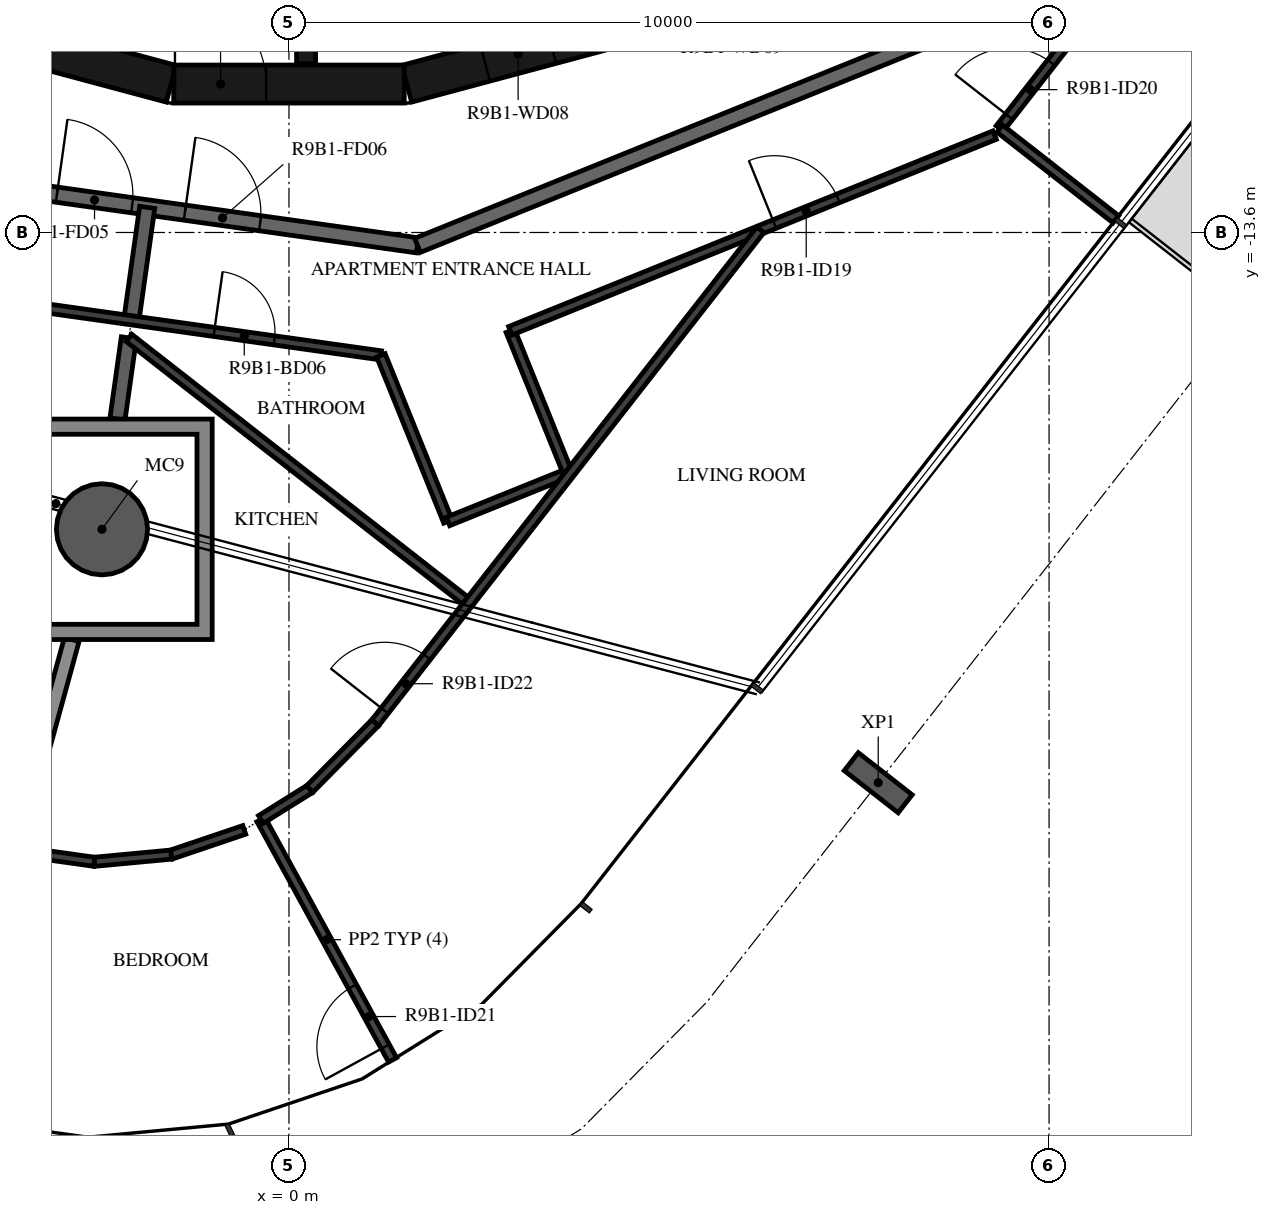
"""IFC4 building model, lengths in metres.
Left out: names, types, materials, properties, quantities, classifications, styles, units other than length and angle.
Written with IfcOpenShell. Run it as: python <this file> out.ifc"""

import sys

from ifc_helpers import new_model, si_unit, direction, frame, frame_2d, origin, origin_2d, place, context, subcontext, project, spatial, polyline, rectangle, hollow_circle, i_section, outline, extrude, element, fill, save


model = new_model("IFC4")
c1 = context("Model", 3, precision=1e-05, world=origin(), true_north=direction((0.0, 1.0)))
c2 = subcontext(c1, "Body", "Model", "MODEL_VIEW")
j1 = project(units=[si_unit("LENGTHUNIT", "METRE"), si_unit("PLANEANGLEUNIT", "RADIAN")], contexts=[c1])
p1 = place(None, origin())
s1 = spatial("IfcSite", under=j1, at=p1, CompositionType="ELEMENT")
p2 = place(p1, origin())
s2 = spatial("IfcBuilding", under=s1, at=p2, CompositionType="ELEMENT")
p3 = place(p2, frame((0.0, 0.0, 343.5)))
s3 = spatial("IfcBuildingStorey", under=s2, at=p3, CompositionType="ELEMENT", Elevation=343.5)
p4 = place(p3, frame((-2.46, -17.505, -0.38), z_axis=(0.0, 0.0, 1.0), x_axis=(1.0, 0.0, 0.0)))
e1 = element("IfcColumn", 1, at=p4, inside=s3, PredefinedType="COLUMN", context=c2, shape_type="SweptSolid", body=[
    extrude(hollow_circle(Radius=0.6, WallThickness=0.03, at=origin_2d()), origin(), (0.0, 0.0, 1.0), 3.5),
])
p5 = place(p3, frame((7.752, -20.839, -0.38), z_axis=(0.0, 0.0, 1.0), x_axis=(-0.615661060634, -0.788011077599, 0.0)))
e2 = element("IfcColumn", 2, at=p5, inside=s3, PredefinedType="COLUMN", context=c2, shape_type="SweptSolid", body=[
    extrude(i_section(OverallWidth=0.3, OverallDepth=0.9, WebThickness=0.019, FlangeThickness=0.035, FilletRadius=0.03, at=origin_2d()), origin(), (0.0, 0.0, 1.0), 3.5),
])
p6 = place(p3, frame((1.55, -11.643, 0.0), z_axis=(0.0, 0.0, 1.0), x_axis=(0.965948410781, 0.258734743916, 0.0)))
e3 = element("IfcWall", 3, at=p6, inside=s3, PredefinedType="SHEAR", context=c2, shape_type="SweptSolid", body=[
    extrude(rectangle(XDim=3.033, YDim=0.5, at=frame_2d((1.516, 0.0))), origin(), (0.0, 0.0, 1.0), 3.12),
])
p7 = place(p6, frame((1.066, 0.0, 0.0)))
e4 = element("IfcOpeningElement", 4, at=p7, cuts=e3, PredefinedType="OPENING", context=c2, shape_type="SweptSolid", body=[
    extrude(rectangle(XDim=0.9, YDim=2.1, at=frame_2d((0.45, 1.05))), frame((0.0, 0.26, 0.0), z_axis=(0.0, -1.0, 0.0), x_axis=(1.0, 0.0, 0.0)), (0.0, 0.0, 1.0), 0.52),
])
p8 = place(p3, frame((-4.479, -10.858, 0.0), z_axis=(0.0, 0.0, 1.0), x_axis=(0.965948410781, -0.258734743916, 0.0)))
e5 = element("IfcWall", 5, at=p8, inside=s3, PredefinedType="SHEAR", context=c2, shape_type="SweptSolid", body=[
    extrude(rectangle(XDim=3.033, YDim=0.5, at=frame_2d((1.516, 0.0))), origin(), (0.0, 0.0, 1.0), 3.12),
])
p9 = place(p3, frame((-1.516, -11.647, 0.0), z_axis=(0.0, 0.0, 1.0), x_axis=(1.0, 0.0, 0.0)))
e6 = element("IfcWall", 6, at=p9, inside=s3, PredefinedType="SHEAR", context=c2, shape_type="SweptSolid", body=[
    extrude(rectangle(XDim=3.033, YDim=0.5, at=frame_2d((1.516, 0.0))), origin(), (0.0, 0.0, 1.0), 3.12),
])
p10 = place(p9, frame((0.016, 0.0, 0.0)))
e7 = element("IfcOpeningElement", 7, at=p10, cuts=e6, PredefinedType="OPENING", context=c2, shape_type="SweptSolid", body=[
    extrude(rectangle(XDim=1.2, YDim=2.1, at=frame_2d((0.6, 1.05))), frame((0.0, 0.26, 0.0), z_axis=(0.0, -1.0, 0.0), x_axis=(1.0, 0.0, 0.0)), (0.0, 0.0, 1.0), 0.52),
])
p11 = place(p3, frame((0.225, -8.97, 0.0), z_axis=(0.0, 0.0, 1.0), x_axis=(0.0, -1.0, 0.0)))
e8 = element("IfcWall", 8, at=p11, inside=s3, PredefinedType="SHEAR", context=c2, shape_type="SweptSolid", body=[
    extrude(rectangle(XDim=2.41, YDim=0.25, at=frame_2d((1.205, 0.0))), origin(), (0.0, 0.0, 1.0), 3.12),
])
p12 = place(p3, frame((-5.42, -12.77, 0.0), z_axis=(0.0, 0.0, 1.0), x_axis=(0.990270565508, -0.139155334385, 0.0)))
e9 = element("IfcWall", 9, at=p12, inside=s3, PredefinedType="STANDARD", context=c2, shape_type="SweptSolid", body=[
    extrude(rectangle(XDim=7.181, YDim=0.2, at=frame_2d((3.59, 0.0))), origin(), (0.0, 0.0, 1.0), 3.12),
])
p13 = place(p12, frame((2.39, 0.0, 0.0)))
e10 = element("IfcOpeningElement", 10, at=p13, cuts=e9, PredefinedType="OPENING", context=c2, shape_type="SweptSolid", body=[
    extrude(rectangle(XDim=1.0, YDim=2.1, at=frame_2d((0.5, 1.05))), frame((0.0, 0.11, 0.0), z_axis=(0.0, -1.0, 0.0), x_axis=(1.0, 0.0, 0.0)), (0.0, 0.0, 1.0), 0.22),
])
p14 = place(p12, frame((4.091, 0.0, 0.0)))
e11 = element("IfcOpeningElement", 11, at=p14, cuts=e9, PredefinedType="OPENING", context=c2, shape_type="SweptSolid", body=[
    extrude(rectangle(XDim=1.0, YDim=2.1, at=frame_2d((0.5, 1.05))), frame((0.0, 0.11, 0.0), z_axis=(0.0, -1.0, 0.0), x_axis=(1.0, 0.0, 0.0)), (0.0, 0.0, 1.0), 0.22),
])
p15 = place(p3, frame((1.691, -13.769, 0.0), z_axis=(0.0, 0.0, 1.0), x_axis=(0.92717916932, 0.374618189599, 0.0)))
e12 = element("IfcWall", 12, at=p15, inside=s3, PredefinedType="STANDARD", context=c2, shape_type="SweptSolid", body=[
    extrude(rectangle(XDim=7.181, YDim=0.2, at=frame_2d((3.591, 0.0))), origin(), (0.0, 0.0, 1.0), 3.12),
])
p16 = place(p3, frame((-2.073, -14.755, 0.0), z_axis=(0.0, 0.0, 1.0), x_axis=(0.139005431033, 0.990291618738, 0.0)))
e13 = element("IfcWall", 13, at=p16, inside=s3, PredefinedType="STANDARD", context=c2, shape_type="SweptSolid", body=[
    extrude(rectangle(XDim=1.5, YDim=0.2, at=frame_2d((0.75, 0.0))), origin(), (0.0, 0.0, 1.0), 3.12),
])
p17 = place(p3, frame((-2.256, -16.055, 0.0), z_axis=(0.0, 0.0, 1.0), x_axis=(0.139109268657, 0.990277037689, 0.0)))
e14 = element("IfcWall", 14, at=p17, inside=s3, PredefinedType="STANDARD", context=c2, shape_type="SweptSolid", body=[
    extrude(rectangle(XDim=1.079, YDim=0.2, at=frame_2d((0.54, 0.0))), origin(), (0.0, 0.0, 1.0), 3.12),
])
p18 = place(p3, frame((-4.574, -25.21, 0.0), z_axis=(0.0, 0.0, 1.0), x_axis=(0.264579024648, 0.964364007892, 0.0)))
e15 = element("IfcWall", 15, at=p18, inside=s3, PredefinedType="STANDARD", context=c2, shape_type="SweptSolid", body=[
    extrude(rectangle(XDim=6.486, YDim=0.2, at=frame_2d((3.243, 0.0))), origin(), (0.0, 0.0, 1.0), 2.73),
])
p19 = place(p3, frame((-6.027, -14.199, 0.0), z_axis=(0.0, 0.0, 1.0), x_axis=(0.990271617837, -0.139147845494, 0.0)))
e16 = element("IfcWall", 16, at=p19, inside=s3, PredefinedType="PARTITIONING", context=c2, shape_type="SweptSolid", body=[
    extrude(rectangle(XDim=7.308, YDim=0.12, at=frame_2d((3.654, 0.0))), origin(), (0.0, 0.0, 1.0), 3.12),
])
p20 = place(p19, frame((5.093, 0.0, 0.0)))
e17 = element("IfcOpeningElement", 17, at=p20, cuts=e16, PredefinedType="OPENING", context=c2, shape_type="SweptSolid", body=[
    extrude(rectangle(XDim=0.8, YDim=2.1, at=frame_2d((0.4, 1.05))), frame((0.0, 0.07, 0.0), z_axis=(0.0, -1.0, 0.0), x_axis=(1.0, 0.0, 0.0)), (0.0, 0.0, 1.0), 0.14),
])
p21 = place(p3, frame((1.209, -15.216, 0.0), z_axis=(0.0, 0.0, 1.0), x_axis=(0.374531550488, -0.927214170345, 0.0)))
e18 = element("IfcWall", 18, at=p21, inside=s3, PredefinedType="PARTITIONING", context=c2, shape_type="SweptSolid", body=[
    extrude(rectangle(XDim=2.357, YDim=0.12, at=frame_2d((1.179, 0.0))), origin(), (0.0, 0.0, 1.0), 3.12),
])
p22 = place(p3, frame((2.092, -17.402, 0.0), z_axis=(0.0, 0.0, 1.0), x_axis=(0.927153589835, 0.374681492546, 0.0)))
e19 = element("IfcWall", 19, at=p22, inside=s3, PredefinedType="PARTITIONING", context=c2, shape_type="SweptSolid", body=[
    extrude(rectangle(XDim=1.7, YDim=0.12, at=frame_2d((0.85, 0.0))), origin(), (0.0, 0.0, 1.0), 3.12),
])
p23 = place(p3, frame((3.668, -16.765, 0.0), z_axis=(0.0, 0.0, 1.0), x_axis=(-0.374621045498, 0.927178015416, 0.0)))
e20 = element("IfcWall", 20, at=p23, inside=s3, PredefinedType="PARTITIONING", context=c2, shape_type="SweptSolid", body=[
    extrude(rectangle(XDim=2.018, YDim=0.12, at=frame_2d((1.009, 0.0))), origin(), (0.0, 0.0, 1.0), 3.12),
])
p24 = place(p3, frame((2.912, -14.894, 0.0), z_axis=(0.0, 0.0, 1.0), x_axis=(0.927182280165, 0.374610490174, 0.0)))
e21 = element("IfcWall", 21, at=p24, inside=s3, PredefinedType="PARTITIONING", context=c2, shape_type="SweptSolid", body=[
    extrude(rectangle(XDim=6.872, YDim=0.12, at=frame_2d((3.436, 0.0))), origin(), (0.0, 0.0, 1.0), 3.12),
])
p25 = place(p24, frame((3.748, 0.0, 0.0)))
e22 = element("IfcOpeningElement", 22, at=p25, cuts=e21, PredefinedType="OPENING", context=c2, shape_type="SweptSolid", body=[
    extrude(rectangle(XDim=0.9, YDim=2.1, at=frame_2d((0.45, 1.05))), frame((0.0, 0.07, 0.0), z_axis=(0.0, -1.0, 0.0), x_axis=(1.0, 0.0, 0.0)), (0.0, 0.0, 1.0), 0.14),
])
p26 = place(p3, frame((9.351, -12.233, 0.0), z_axis=(0.0, 0.0, 1.0), x_axis=(0.615678207218, 0.787997680933, 0.0)))
e23 = element("IfcWall", 23, at=p26, inside=s3, PredefinedType="PARTITIONING", context=c2, shape_type="SweptSolid", body=[
    extrude(rectangle(XDim=7.765, YDim=0.12, at=frame_2d((3.883, 0.0))), origin(), (0.0, 0.0, 1.0), 3.12),
])
p27 = place(p26, frame((0.2, 0.0, 0.0)))
e24 = element("IfcOpeningElement", 24, at=p27, cuts=e23, PredefinedType="OPENING", context=c2, shape_type="SweptSolid", body=[
    extrude(rectangle(XDim=0.9, YDim=2.1, at=frame_2d((0.45, 1.05))), frame((0.0, 0.07, 0.0), z_axis=(0.0, -1.0, 0.0), x_axis=(1.0, 0.0, 0.0)), (0.0, 0.0, 1.0), 0.14),
])
p28 = place(p3, frame((-0.588, -21.459, 0.0), z_axis=(0.0, 0.0, 1.0), x_axis=(-0.94737753159, -0.320118435332, 0.0)))
e25 = element("IfcWall", 25, at=p28, inside=s3, PredefinedType="PARTITIONING", context=c2, shape_type="SweptSolid", body=[
    extrude(rectangle(XDim=1.016, YDim=0.12, at=frame_2d((0.508, 0.0))), origin(), (0.0, 0.0, 1.0), 3.12),
])
p29 = place(p3, frame((-1.55, -21.785, 0.0), z_axis=(0.0, 0.0, 1.0), x_axis=(-0.995667655176, -0.092983441736, 0.0)))
e26 = element("IfcWall", 26, at=p29, inside=s3, PredefinedType="PARTITIONING", context=c2, shape_type="SweptSolid", body=[
    extrude(rectangle(XDim=1.016, YDim=0.12, at=frame_2d((0.508, 0.0))), origin(), (0.0, 0.0, 1.0), 3.12),
])
p30 = place(p3, frame((-2.562, -21.879, 0.0), z_axis=(0.0, 0.0, 1.0), x_axis=(-0.990273657549, 0.139133328736, 0.0)))
e27 = element("IfcWall", 27, at=p30, inside=s3, PredefinedType="PARTITIONING", context=c2, shape_type="SweptSolid", body=[
    extrude(rectangle(XDim=1.016, YDim=0.12, at=frame_2d((0.508, 0.0))), origin(), (0.0, 0.0, 1.0), 3.12),
])
p31 = place(p3, frame((1.363, -24.485, 0.0), z_axis=(0.0, 0.0, 1.0), x_axis=(-0.480374148719, 0.877063667725, 0.0)))
e28 = element("IfcWall", 28, at=p31, inside=s3, PredefinedType="PARTITIONING", context=c2, shape_type="SweptSolid", body=[
    extrude(rectangle(XDim=3.606, YDim=0.12, at=frame_2d((1.803, 0.0))), origin(), (0.0, 0.0, 1.0), 2.73),
])
p32 = place(p31, frame((0.2, 0.0, 0.0)))
e29 = element("IfcOpeningElement", 29, at=p32, cuts=e28, PredefinedType="OPENING", context=c2, shape_type="SweptSolid", body=[
    extrude(rectangle(XDim=0.9, YDim=2.1, at=frame_2d((0.45, 1.05))), frame((0.0, 0.07, 0.0), z_axis=(0.0, -1.0, 0.0), x_axis=(1.0, 0.0, 0.0)), (0.0, 0.0, 1.0), 0.14),
])
p33 = place(p3, frame((2.363, -18.478, 0.0), z_axis=(0.0, 0.0, 1.0), x_axis=(-0.788010669333, 0.615661583191, 0.0)))
e30 = element("IfcWall", 30, at=p33, inside=s3, PredefinedType="PARTITIONING", context=c2, shape_type="SweptSolid", body=[
    extrude(rectangle(XDim=5.672, YDim=0.12, at=frame_2d((2.836, 0.0))), origin(), (0.0, 0.0, 1.0), 3.12),
])
p34 = place(p3, frame((-0.369, -21.323, 0.0), z_axis=(0.0, 0.0, 1.0), x_axis=(0.847998304005, 0.529998940003, 0.0)))
e31 = element("IfcWall", 31, at=p34, inside=s3, PredefinedType="PARTITIONING", context=c2, shape_type="SweptSolid", body=[
    extrude(rectangle(XDim=0.758, YDim=0.12, at=frame_2d((0.379, 0.0))), origin(), (0.0, 0.0, 1.0), 3.12),
])
p35 = place(p3, frame((0.274, -20.921, 0.0), z_axis=(0.0, 0.0, 1.0), x_axis=(0.702915150142, 0.711273710818, 0.0)))
e32 = element("IfcWall", 32, at=p35, inside=s3, PredefinedType="PARTITIONING", context=c2, shape_type="SweptSolid", body=[
    extrude(rectangle(XDim=1.227, YDim=0.12, at=frame_2d((0.613, 0.0))), origin(), (0.0, 0.0, 1.0), 3.12),
])
p36 = place(p3, frame((1.136, -20.049, 0.0), z_axis=(0.0, 0.0, 1.0), x_axis=(0.615662465763, 0.788009979792, 0.0)))
e33 = element("IfcWall", 33, at=p36, inside=s3, PredefinedType="PARTITIONING", context=c2, shape_type="SweptSolid", body=[
    extrude(rectangle(XDim=8.229, YDim=0.12, at=frame_2d((4.114, 0.0))), origin(), (0.0, 0.0, 1.0), 3.12),
])
p37 = place(p36, frame((0.2, 0.0, 0.0)))
e34 = element("IfcOpeningElement", 34, at=p37, cuts=e33, PredefinedType="OPENING", context=c2, shape_type="SweptSolid", body=[
    extrude(rectangle(XDim=0.9, YDim=2.1, at=frame_2d((0.45, 1.05))), frame((0.0, 0.07, 0.0), z_axis=(0.0, -1.0, 0.0), x_axis=(1.0, 0.0, 0.0)), (0.0, 0.0, 1.0), 0.14),
])
p38 = place(p3, frame((10.878, -13.427, 0.0), z_axis=(0.0, 0.0, 1.0), x_axis=(-0.787980458379, 0.615700249483, 0.0)))
e35 = element("IfcWall", 35, at=p38, inside=s3, PredefinedType="PARTITIONING", context=c2, shape_type="SweptSolid", body=[
    extrude(rectangle(XDim=1.939, YDim=0.12, at=frame_2d((0.969, 0.0))), origin(), (0.0, 0.0, 1.0), 2.73),
])
p39 = place(p3, origin())
e36 = element("IfcWall", 36, at=p39, inside=s3, PredefinedType="STANDARD", context=c2, shape_type="SweptSolid", body=[
    extrude(outline(polyline([(-1.01, -16.055), (-1.01, -18.955), (-3.91, -18.955), (-3.91, -16.055), (-1.01, -16.055)]), holes=[polyline([(-3.71, -18.755), (-1.21, -18.755), (-1.21, -16.255), (-3.71, -16.255), (-3.71, -18.755)])]), origin(), (0.0, 0.0, 1.0), 3.12),
])
p40 = place(p10, origin())
e37 = element("IfcDoor", 37, at=p40, inside=s3, OperationType="SINGLE_SWING_RIGHT", PredefinedType="DOOR", context=c2, shape_type="SweptSolid", body=[
    extrude(rectangle(XDim=1.2, YDim=2.1, at=frame_2d((0.6, 1.05))), frame((0.0, 0.025, 0.0), z_axis=(0.0, -1.0, 0.0), x_axis=(1.0, 0.0, 0.0)), (0.0, 0.0, 1.0), 0.05),
])
fill(e7, e37)
p41 = place(p7, origin())
e38 = element("IfcDoor", 38, at=p41, inside=s3, OperationType="SINGLE_SWING_RIGHT", PredefinedType="DOOR", context=c2, shape_type="SweptSolid", body=[
    extrude(rectangle(XDim=0.9, YDim=2.1, at=frame_2d((0.45, 1.05))), frame((0.0, 0.025, 0.0), z_axis=(0.0, -1.0, 0.0), x_axis=(1.0, 0.0, 0.0)), (0.0, 0.0, 1.0), 0.05),
])
fill(e4, e38)
p42 = place(p13, origin())
e39 = element("IfcDoor", 39, at=p42, inside=s3, OperationType="SINGLE_SWING_RIGHT", PredefinedType="DOOR", context=c2, shape_type="SweptSolid", body=[
    extrude(rectangle(XDim=1.0, YDim=2.1, at=frame_2d((0.5, 1.05))), frame((0.0, 0.025, 0.0), z_axis=(0.0, -1.0, 0.0), x_axis=(1.0, 0.0, 0.0)), (0.0, 0.0, 1.0), 0.05),
])
fill(e10, e39)
p43 = place(p14, origin())
e40 = element("IfcDoor", 40, at=p43, inside=s3, OperationType="SINGLE_SWING_RIGHT", PredefinedType="DOOR", context=c2, shape_type="SweptSolid", body=[
    extrude(rectangle(XDim=1.0, YDim=2.1, at=frame_2d((0.5, 1.05))), frame((0.0, 0.025, 0.0), z_axis=(0.0, -1.0, 0.0), x_axis=(1.0, 0.0, 0.0)), (0.0, 0.0, 1.0), 0.05),
])
fill(e11, e40)
p44 = place(p20, origin())
e41 = element("IfcDoor", 41, at=p44, inside=s3, OperationType="SINGLE_SWING_LEFT", PredefinedType="DOOR", context=c2, shape_type="SweptSolid", body=[
    extrude(rectangle(XDim=0.8, YDim=2.1, at=frame_2d((0.4, 1.05))), frame((0.0, 0.025, 0.0), z_axis=(0.0, -1.0, 0.0), x_axis=(1.0, 0.0, 0.0)), (0.0, 0.0, 1.0), 0.05),
])
fill(e17, e41)
p45 = place(p25, origin())
e42 = element("IfcDoor", 42, at=p45, inside=s3, OperationType="SINGLE_SWING_LEFT", PredefinedType="DOOR", context=c2, shape_type="SweptSolid", body=[
    extrude(rectangle(XDim=0.9, YDim=2.1, at=frame_2d((0.45, 1.05))), frame((0.0, 0.025, 0.0), z_axis=(0.0, -1.0, 0.0), x_axis=(1.0, 0.0, 0.0)), (0.0, 0.0, 1.0), 0.05),
])
fill(e22, e42)
p46 = place(p27, origin())
e43 = element("IfcDoor", 43, at=p46, inside=s3, OperationType="SINGLE_SWING_LEFT", PredefinedType="DOOR", context=c2, shape_type="SweptSolid", body=[
    extrude(rectangle(XDim=0.9, YDim=2.1, at=frame_2d((0.45, 1.05))), frame((0.0, 0.025, 0.0), z_axis=(0.0, -1.0, 0.0), x_axis=(1.0, 0.0, 0.0)), (0.0, 0.0, 1.0), 0.05),
])
fill(e24, e43)
p47 = place(p32, origin())
e44 = element("IfcDoor", 44, at=p47, inside=s3, OperationType="SINGLE_SWING_LEFT", PredefinedType="DOOR", context=c2, shape_type="SweptSolid", body=[
    extrude(rectangle(XDim=0.9, YDim=2.1, at=frame_2d((0.45, 1.05))), frame((0.0, 0.025, 0.0), z_axis=(0.0, -1.0, 0.0), x_axis=(1.0, 0.0, 0.0)), (0.0, 0.0, 1.0), 0.05),
])
fill(e29, e44)
p48 = place(p37, origin())
e45 = element("IfcDoor", 45, at=p48, inside=s3, OperationType="SINGLE_SWING_RIGHT", PredefinedType="DOOR", context=c2, shape_type="SweptSolid", body=[
    extrude(rectangle(XDim=0.9, YDim=2.1, at=frame_2d((0.45, 1.05))), frame((0.0, 0.025, 0.0), z_axis=(0.0, -1.0, 0.0), x_axis=(1.0, 0.0, 0.0)), (0.0, 0.0, 1.0), 0.05),
])
fill(e34, e45)
save(model, sys.argv[1])
